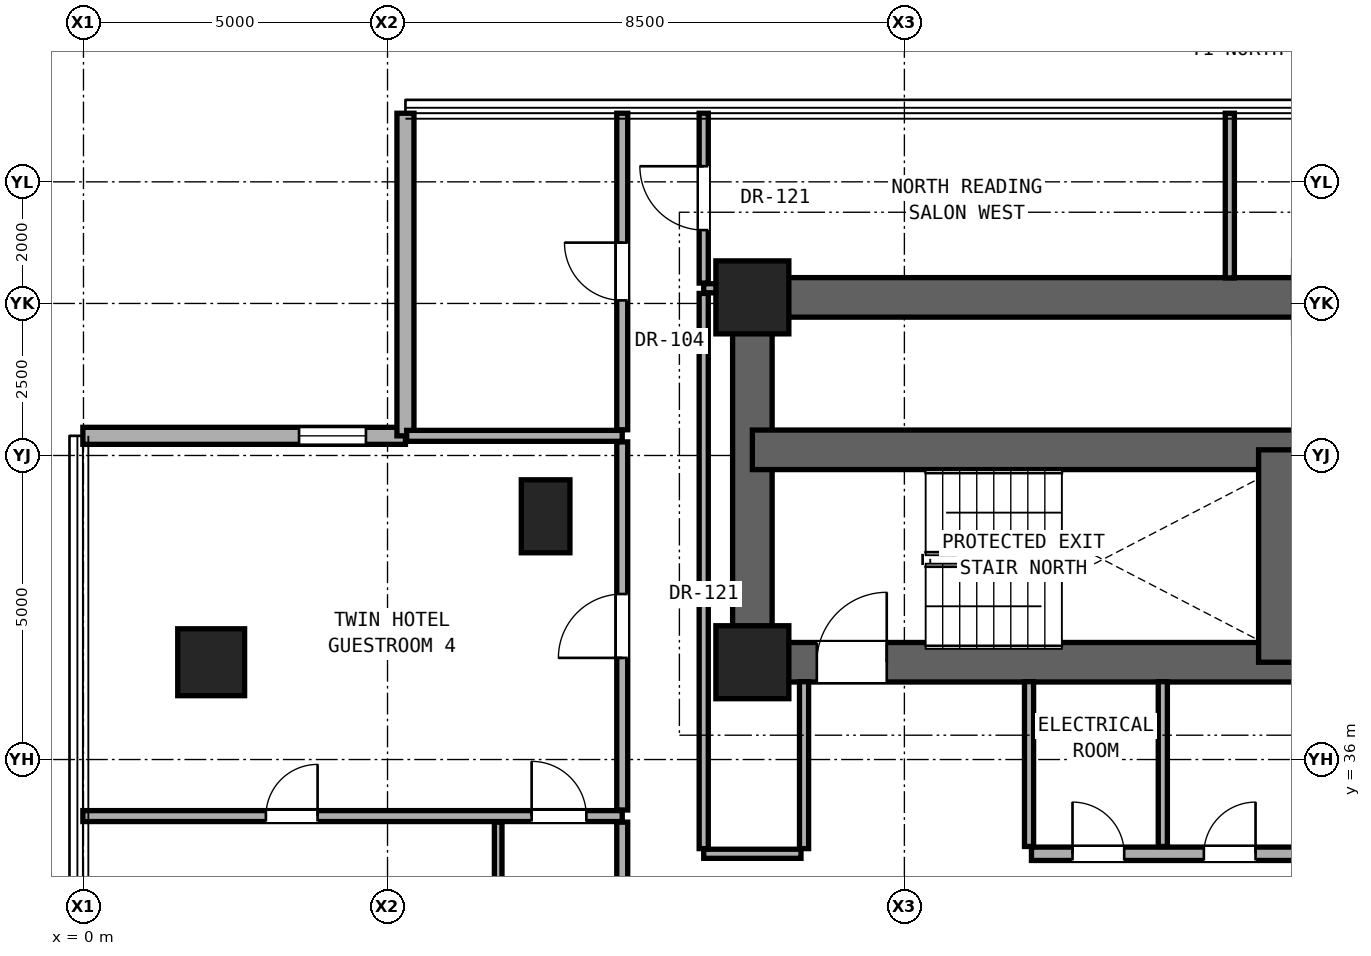
"""IFC4 building model, lengths in metres.
Left out: names, types, materials, properties, quantities, classifications, styles, units other than length and angle.
Written with IfcOpenShell. Run it as: python <this file> out.ifc"""

import sys

from ifc_helpers import new_model, si_unit, direction, frame, frame_2d, origin, origin_2d, place, context, subcontext, project, spatial, rectangle, hollow_rectangle, extrude, element, fill, save


model = new_model("IFC4")
c1 = context("Model", 3, precision=1e-05, world=origin(), true_north=direction((0.0, 1.0)))
c2 = subcontext(c1, "Body", "Model", "MODEL_VIEW")
j1 = project(units=[si_unit("LENGTHUNIT", "METRE"), si_unit("PLANEANGLEUNIT", "RADIAN")], contexts=[c1])
p1 = place(None, origin())
s1 = spatial("IfcSite", under=j1, at=p1, CompositionType="ELEMENT")
p2 = place(p1, origin())
s2 = spatial("IfcBuilding", under=s1, at=p2, CompositionType="ELEMENT")
p3 = place(p2, frame((0.0, 0.0, 91.7)))
s3 = spatial("IfcBuildingStorey", under=s2, at=p3, CompositionType="ELEMENT", Elevation=91.7)
for number, where, z_axis, x_axis in (
    (1, (11.0, 37.6, 0.0), (0.0, 0.0, 1.0), (1.0, 0.0, 0.0)),
    (2, (11.0, 43.6, 0.0), (0.0, 0.0, 1.0), (1.0, 0.0, 0.0)),
):
    element("IfcColumn", number, at=place(p3, frame(where, z_axis=z_axis, x_axis=x_axis)), inside=s3, PredefinedType="COLUMN", context=c2, shape_type="SweptSolid", body=[
        extrude(rectangle(XDim=1.2, YDim=1.2, at=origin_2d()), origin(), (0.0, 0.0, 1.0), 3.3),
    ])
p4 = place(p3, frame((2.1, 37.6, 0.0), z_axis=(0.0, 0.0, 1.0), x_axis=(1.0, 0.0, 0.0)))
e3 = element("IfcColumn", 3, at=p4, inside=s3, PredefinedType="COLUMN", context=c2, shape_type="SweptSolid", body=[
    extrude(hollow_rectangle(XDim=1.1, YDim=1.1, WallThickness=0.06, at=origin_2d()), origin(), (0.0, 0.0, 1.0), 3.3),
])
p5 = place(p3, frame((7.6, 40.0, 0.0), z_axis=(0.0, 0.0, 1.0), x_axis=(1.0, 0.0, 0.0)))
e4 = element("IfcColumn", 4, at=p5, inside=s3, PredefinedType="PILASTER", context=c2, shape_type="SweptSolid", body=[
    extrude(rectangle(XDim=0.8, YDim=1.2, at=origin_2d()), origin(), (0.0, 0.0, 1.0), 3.3),
])
p6 = place(p3, frame((11.0, 43.6, 0.0), z_axis=(0.0, 0.0, 1.0), x_axis=(1.0, 0.0, 0.0)))
e5 = element("IfcWall", 5, at=p6, inside=s3, PredefinedType="SHEAR", context=c2, shape_type="SweptSolid", body=[
    extrude(rectangle(XDim=19.0, YDim=0.65, at=frame_2d((9.5, 0.0))), origin(), (0.0, 0.0, 1.0), 3.08),
])
p7 = place(p3, frame((11.0, 37.6, 0.0), z_axis=(0.0, 0.0, 1.0), x_axis=(0.0, 1.0, 0.0)))
e6 = element("IfcWall", 6, at=p7, inside=s3, PredefinedType="SHEAR", context=c2, shape_type="SweptSolid", body=[
    extrude(rectangle(XDim=6.0, YDim=0.65, at=frame_2d((3.0, 0.0))), origin(), (0.0, 0.0, 1.0), 3.08),
])
p8 = place(p3, frame((11.0, 37.6, 0.0), z_axis=(0.0, 0.0, 1.0), x_axis=(1.0, 0.0, 0.0)))
e7 = element("IfcWall", 7, at=p8, inside=s3, PredefinedType="SHEAR", context=c2, shape_type="SweptSolid", body=[
    extrude(rectangle(XDim=19.0, YDim=0.65, at=frame_2d((9.5, 0.0))), origin(), (0.0, 0.0, 1.0), 3.08),
])
p9 = place(p8, frame((1.06, 0.0, 0.0)))
e8 = element("IfcOpeningElement", 8, at=p9, cuts=e7, PredefinedType="OPENING", context=c2, shape_type="SweptSolid", body=[
    extrude(rectangle(XDim=1.15, YDim=2.2, at=frame_2d((0.575, 1.1))), frame((0.0, 0.335, 0.0), z_axis=(0.0, -1.0, 0.0), x_axis=(1.0, 0.0, 0.0)), (0.0, 0.0, 1.0), 0.67),
])
p10 = place(p8, frame((9.55, 0.0, 0.0)))
e9 = element("IfcOpeningElement", 9, at=p10, cuts=e7, PredefinedType="OPENING", context=c2, shape_type="SweptSolid", body=[
    extrude(rectangle(XDim=1.4, YDim=2.35, at=frame_2d((0.7, 1.175))), frame((0.0, 0.335, 0.0), z_axis=(0.0, -1.0, 0.0), x_axis=(1.0, 0.0, 0.0)), (0.0, 0.0, 1.0), 0.67),
])
p11 = place(p8, frame((11.95, 0.0, 0.0)))
e10 = element("IfcOpeningElement", 10, at=p11, cuts=e7, PredefinedType="OPENING", context=c2, shape_type="SweptSolid", body=[
    extrude(rectangle(XDim=1.4, YDim=2.35, at=frame_2d((0.7, 1.175))), frame((0.0, 0.335, 0.0), z_axis=(0.0, -1.0, 0.0), x_axis=(1.0, 0.0, 0.0)), (0.0, 0.0, 1.0), 0.67),
])
p12 = place(p8, frame((14.4, 0.0, 0.0)))
e11 = element("IfcOpeningElement", 11, at=p12, cuts=e7, PredefinedType="OPENING", context=c2, shape_type="SweptSolid", body=[
    extrude(rectangle(XDim=1.3, YDim=2.3, at=frame_2d((0.65, 1.15))), frame((0.0, 0.335, 0.0), z_axis=(0.0, -1.0, 0.0), x_axis=(1.0, 0.0, 0.0)), (0.0, 0.0, 1.0), 0.67),
])
p13 = place(p8, frame((16.6, 0.0, 0.0)))
e12 = element("IfcOpeningElement", 12, at=p13, cuts=e7, PredefinedType="OPENING", context=c2, shape_type="SweptSolid", body=[
    extrude(rectangle(XDim=1.3, YDim=2.3, at=frame_2d((0.65, 1.15))), frame((0.0, 0.335, 0.0), z_axis=(0.0, -1.0, 0.0), x_axis=(1.0, 0.0, 0.0)), (0.0, 0.0, 1.0), 0.67),
])
p14 = place(p3, frame((11.0, 41.093, 0.0), z_axis=(0.0, 0.0, 1.0), x_axis=(1.0, 0.0, 0.0)))
e13 = element("IfcWall", 13, at=p14, inside=s3, PredefinedType="SHEAR", context=c2, shape_type="SweptSolid", body=[
    extrude(rectangle(XDim=9.0, YDim=0.65, at=frame_2d((4.5, 0.0))), origin(), (0.0, 0.0, 1.0), 3.08),
])
p15 = place(p3, frame((19.65, 37.6, 0.0), z_axis=(0.0, 0.0, 1.0), x_axis=(0.0, 1.0, 0.0)))
e14 = element("IfcWall", 14, at=p15, inside=s3, PredefinedType="SHEAR", context=c2, shape_type="SweptSolid", body=[
    extrude(rectangle(XDim=3.493, YDim=0.65, at=frame_2d((1.747, 0.0))), origin(), (0.0, 0.0, 1.0), 3.08),
])
p16 = place(p3, frame((5.295, 41.323, 0.0), z_axis=(0.0, 0.0, 1.0), x_axis=(-1.0, 0.0, 0.0)))
e15 = element("IfcWall", 15, at=p16, inside=s3, PredefinedType="SOLIDWALL", context=c2, shape_type="SweptSolid", body=[
    extrude(rectangle(XDim=5.305, YDim=0.28, at=frame_2d((2.652, 0.0))), origin(), (0.0, 0.0, 1.0), 3.06),
])
p17 = place(p16, frame((0.65, 0.0, 0.85)))
e16 = element("IfcOpeningElement", 16, at=p17, cuts=e15, PredefinedType="OPENING", context=c2, shape_type="SweptSolid", body=[
    extrude(rectangle(XDim=1.1, YDim=2.0, at=frame_2d((0.55, 1.0))), frame((0.0, 0.15, 0.0), z_axis=(0.0, -1.0, 0.0), x_axis=(1.0, 0.0, 0.0)), (0.0, 0.0, 1.0), 0.3),
])
p18 = place(p3, frame((5.295, 46.628, 0.0), z_axis=(0.0, 0.0, 1.0), x_axis=(0.0, -1.0, 0.0)))
e17 = element("IfcWall", 17, at=p18, inside=s3, PredefinedType="SOLIDWALL", context=c2, shape_type="SweptSolid", body=[
    extrude(rectangle(XDim=5.305, YDim=0.28, at=frame_2d((2.652, 0.0))), origin(), (0.0, 0.0, 1.0), 3.06),
])
p19 = place(p3, frame((10.2, 34.45, 0.0), z_axis=(0.0, 0.0, 1.0), x_axis=(1.0, 0.0, 0.0)))
e18 = element("IfcWall", 18, at=p19, inside=s3, PredefinedType="PARTITIONING", context=c2, shape_type="SweptSolid", body=[
    extrude(rectangle(XDim=1.6, YDim=0.15, at=frame_2d((0.8, 0.0))), origin(), (0.0, 0.0, 1.0), 2.124),
])
p20 = place(p3, frame((15.59, 34.45, 0.0), z_axis=(0.0, 0.0, 1.0), x_axis=(1.0, 0.0, 0.0)))
e19 = element("IfcWall", 19, at=p20, inside=s3, PredefinedType="SOLIDWALL", context=c2, shape_type="SweptSolid", body=[
    extrude(rectangle(XDim=15.21, YDim=0.22, at=frame_2d((7.605, 0.0))), origin(), (0.0, 0.0, 1.0), 2.124),
])
p21 = place(p20, frame((6.435, 0.0, 0.0)))
e20 = element("IfcOpeningElement", 20, at=p21, cuts=e19, PredefinedType="OPENING", context=c2, shape_type="SweptSolid", body=[
    extrude(rectangle(XDim=0.85, YDim=2.01, at=frame_2d((0.425, 1.005))), frame((0.0, 0.12, 0.0), z_axis=(0.0, -1.0, 0.0), x_axis=(1.0, 0.0, 0.0)), (0.0, 0.0, 1.0), 0.24),
])
p22 = place(p20, frame((11.135, 0.0, 0.0)))
e21 = element("IfcOpeningElement", 21, at=p22, cuts=e19, PredefinedType="OPENING", context=c2, shape_type="SweptSolid", body=[
    extrude(rectangle(XDim=0.85, YDim=2.01, at=frame_2d((0.425, 1.005))), frame((0.0, 0.12, 0.0), z_axis=(0.0, -1.0, 0.0), x_axis=(1.0, 0.0, 0.0)), (0.0, 0.0, 1.0), 0.24),
])
p23 = place(p20, frame((0.675, 0.0, 0.0)))
e22 = element("IfcOpeningElement", 22, at=p23, cuts=e19, PredefinedType="OPENING", context=c2, shape_type="SweptSolid", body=[
    extrude(rectangle(XDim=0.85, YDim=2.01, at=frame_2d((0.425, 1.005))), frame((0.0, 0.12, 0.0), z_axis=(0.0, -1.0, 0.0), x_axis=(1.0, 0.0, 0.0)), (0.0, 0.0, 1.0), 0.24),
])
p24 = place(p20, frame((2.835, 0.0, 0.0)))
e23 = element("IfcOpeningElement", 23, at=p24, cuts=e19, PredefinedType="OPENING", context=c2, shape_type="SweptSolid", body=[
    extrude(rectangle(XDim=0.85, YDim=2.01, at=frame_2d((0.425, 1.005))), frame((0.0, 0.12, 0.0), z_axis=(0.0, -1.0, 0.0), x_axis=(1.0, 0.0, 0.0)), (0.0, 0.0, 1.0), 0.24),
])
p25 = place(p3, frame((-0.01, 35.07, 0.0), z_axis=(0.0, 0.0, 1.0), x_axis=(1.0, 0.0, 0.0)))
e24 = element("IfcWall", 24, at=p25, inside=s3, PredefinedType="PARTITIONING", context=c2, shape_type="SweptSolid", body=[
    extrude(rectangle(XDim=8.87, YDim=0.18, at=frame_2d((4.435, 0.0))), origin(), (0.0, 0.0, 1.0), 2.145),
])
p26 = place(p25, frame((3.01, 0.0, 0.0)))
e25 = element("IfcOpeningElement", 25, at=p26, cuts=e24, PredefinedType="OPENING", context=c2, shape_type="SweptSolid", body=[
    extrude(rectangle(XDim=0.85, YDim=2.01, at=frame_2d((0.425, 1.005))), frame((0.0, 0.1, 0.0), z_axis=(0.0, -1.0, 0.0), x_axis=(1.0, 0.0, 0.0)), (0.0, 0.0, 1.0), 0.2),
])
p27 = place(p25, frame((7.38, 0.0, 0.0)))
e26 = element("IfcOpeningElement", 26, at=p27, cuts=e24, PredefinedType="OPENING", context=c2, shape_type="SweptSolid", body=[
    extrude(rectangle(XDim=0.9, YDim=2.1, at=frame_2d((0.45, 1.05))), frame((0.0, 0.1, 0.0), z_axis=(0.0, -1.0, 0.0), x_axis=(1.0, 0.0, 0.0)), (0.0, 0.0, 1.0), 0.2),
])
p28 = place(p3, frame((5.315, 41.323, 0.0), z_axis=(0.0, 0.0, 1.0), x_axis=(1.0, 0.0, 0.0)))
e27 = element("IfcWall", 27, at=p28, inside=s3, PredefinedType="PARTITIONING", context=c2, shape_type="SweptSolid", body=[
    extrude(rectangle(XDim=3.545, YDim=0.18, at=frame_2d((1.772, 0.0))), origin(), (0.0, 0.0, 1.0), 3.08),
])
p29 = place(p3, frame((10.2, 43.75, 0.0), z_axis=(0.0, 0.0, 1.0), x_axis=(1.0, 0.0, 0.0)))
e28 = element("IfcWall", 28, at=p29, inside=s3, PredefinedType="PARTITIONING", context=c2, shape_type="SweptSolid", body=[
    extrude(rectangle(XDim=0.48, YDim=0.15, at=frame_2d((0.24, 0.0))), origin(), (0.0, 0.0, 1.0), 3.08),
])
p30 = place(p3, frame((6.82, 32.87, 0.0), z_axis=(0.0, 0.0, 1.0), x_axis=(0.0, 1.0, 0.0)))
e29 = element("IfcWall", 29, at=p30, inside=s3, PredefinedType="PARTITIONING", context=c2, shape_type="SweptSolid", body=[
    extrude(rectangle(XDim=2.1, YDim=0.125, at=frame_2d((1.05, 0.0))), origin(), (0.0, 0.0, 1.0), 3.08),
])
p31 = place(p3, frame((8.86, 32.87, 0.0), z_axis=(0.0, 0.0, 1.0), x_axis=(0.0, 1.0, 0.0)))
e30 = element("IfcWall", 30, at=p31, inside=s3, PredefinedType="PARTITIONING", context=c2, shape_type="SweptSolid", body=[
    extrude(rectangle(XDim=2.1, YDim=0.18, at=frame_2d((1.05, 0.0))), origin(), (0.0, 0.0, 1.0), 3.08),
])
p32 = place(p3, frame((8.86, 35.17, 0.0), z_axis=(0.0, 0.0, 1.0), x_axis=(0.0, 1.0, 0.0)))
e31 = element("IfcWall", 31, at=p32, inside=s3, PredefinedType="PARTITIONING", context=c2, shape_type="SweptSolid", body=[
    extrude(rectangle(XDim=6.053, YDim=0.18, at=frame_2d((3.026, 0.0))), origin(), (0.0, 0.0, 1.0), 2.456),
])
p33 = place(p32, frame((2.501, 0.0, 0.0)))
e32 = element("IfcOpeningElement", 32, at=p33, cuts=e31, PredefinedType="OPENING", context=c2, shape_type="SweptSolid", body=[
    extrude(rectangle(XDim=1.05, YDim=2.2, at=frame_2d((0.525, 1.1))), frame((0.0, 0.1, 0.0), z_axis=(0.0, -1.0, 0.0), x_axis=(1.0, 0.0, 0.0)), (0.0, 0.0, 1.0), 0.2),
])
p34 = place(p3, frame((8.86, 41.423, 0.0), z_axis=(0.0, 0.0, 1.0), x_axis=(0.0, 1.0, 0.0)))
e33 = element("IfcWall", 33, at=p34, inside=s3, PredefinedType="PARTITIONING", context=c2, shape_type="SweptSolid", body=[
    extrude(rectangle(XDim=5.205, YDim=0.18, at=frame_2d((2.603, 0.0))), origin(), (0.0, 0.0, 1.0), 3.08),
])
p35 = place(p34, frame((2.127, 0.0, 0.0)))
e34 = element("IfcOpeningElement", 34, at=p35, cuts=e33, PredefinedType="OPENING", context=c2, shape_type="SweptSolid", body=[
    extrude(rectangle(XDim=0.95, YDim=2.15, at=frame_2d((0.475, 1.075))), frame((0.0, 0.1, 0.0), z_axis=(0.0, -1.0, 0.0), x_axis=(1.0, 0.0, 0.0)), (0.0, 0.0, 1.0), 0.2),
])
p36 = place(p3, frame((10.2, 34.535, 0.0), z_axis=(0.0, 0.0, 1.0), x_axis=(0.0, 1.0, 0.0)))
e35 = element("IfcWall", 35, at=p36, inside=s3, PredefinedType="PARTITIONING", context=c2, shape_type="SweptSolid", body=[
    extrude(rectangle(XDim=9.13, YDim=0.15, at=frame_2d((4.565, 0.0))), origin(), (0.0, 0.0, 1.0), 2.456),
])
p37 = place(p3, frame((10.2, 43.835, 0.0), z_axis=(0.0, 0.0, 1.0), x_axis=(0.0, 1.0, 0.0)))
e36 = element("IfcWall", 36, at=p37, inside=s3, PredefinedType="PARTITIONING", context=c2, shape_type="SweptSolid", body=[
    extrude(rectangle(XDim=2.793, YDim=0.15, at=frame_2d((1.396, 0.0))), origin(), (0.0, 0.0, 1.0), 3.08),
])
p38 = place(p37, frame((0.872, 0.0, 0.0)))
e37 = element("IfcOpeningElement", 37, at=p38, cuts=e36, PredefinedType="OPENING", context=c2, shape_type="SweptSolid", body=[
    extrude(rectangle(XDim=1.05, YDim=2.2, at=frame_2d((0.525, 1.1))), frame((0.0, 0.085, 0.0), z_axis=(0.0, -1.0, 0.0), x_axis=(1.0, 0.0, 0.0)), (0.0, 0.0, 1.0), 0.17),
])
p39 = place(p3, frame((11.85, 34.535, 0.0), z_axis=(0.0, 0.0, 1.0), x_axis=(0.0, 1.0, 0.0)))
e38 = element("IfcWall", 38, at=p39, inside=s3, PredefinedType="PARTITIONING", context=c2, shape_type="SweptSolid", body=[
    extrude(rectangle(XDim=2.745, YDim=0.15, at=frame_2d((1.373, 0.0))), origin(), (0.0, 0.0, 1.0), 3.08),
])
p40 = place(p3, frame((15.55, 34.57, 0.0), z_axis=(0.0, 0.0, 1.0), x_axis=(0.0, 1.0, 0.0)))
e39 = element("IfcWall", 39, at=p40, inside=s3, PredefinedType="PARTITIONING", context=c2, shape_type="SweptSolid", body=[
    extrude(rectangle(XDim=2.71, YDim=0.15, at=frame_2d((1.355, 0.0))), origin(), (0.0, 0.0, 1.0), 2.609),
])
p41 = place(p3, frame((17.75, 34.57, 0.0), z_axis=(0.0, 0.0, 1.0), x_axis=(0.0, 1.0, 0.0)))
e40 = element("IfcWall", 40, at=p41, inside=s3, PredefinedType="PARTITIONING", context=c2, shape_type="SweptSolid", body=[
    extrude(rectangle(XDim=2.71, YDim=0.15, at=frame_2d((1.355, 0.0))), origin(), (0.0, 0.0, 1.0), 3.08),
])
p42 = place(p3, frame((18.852, 43.92, 0.0), z_axis=(0.0, 0.0, 1.0), x_axis=(0.0, 1.0, 0.0)))
e41 = element("IfcWall", 41, at=p42, inside=s3, PredefinedType="PARTITIONING", context=c2, shape_type="SweptSolid", body=[
    extrude(rectangle(XDim=2.708, YDim=0.15, at=frame_2d((1.354, 0.0))), origin(), (0.0, 0.0, 1.0), 3.08),
])
p43 = place(p17, origin())
e42 = element("IfcWindow", 42, at=p43, inside=s3, PartitioningType="SINGLE_PANEL", PredefinedType="WINDOW", context=c2, shape_type="SweptSolid", body=[
    extrude(rectangle(XDim=1.1, YDim=2.0, at=frame_2d((0.55, 1.0))), frame((0.0, 0.03, 0.0), z_axis=(0.0, -1.0, 0.0), x_axis=(1.0, 0.0, 0.0)), (0.0, 0.0, 1.0), 0.06),
])
fill(e16, e42)
p44 = place(p9, origin())
e43 = element("IfcDoor", 43, at=p44, inside=s3, OperationType="SINGLE_SWING_RIGHT", PredefinedType="DOOR", context=c2, shape_type="SweptSolid", body=[
    extrude(rectangle(XDim=1.15, YDim=2.2, at=frame_2d((0.575, 1.1))), frame((0.0, 0.025, 0.0), z_axis=(0.0, -1.0, 0.0), x_axis=(1.0, 0.0, 0.0)), (0.0, 0.0, 1.0), 0.05),
])
fill(e8, e43)
p45 = place(p23, origin())
e44 = element("IfcDoor", 44, at=p45, inside=s3, OperationType="SINGLE_SWING_LEFT", PredefinedType="DOOR", context=c2, shape_type="SweptSolid", body=[
    extrude(rectangle(XDim=0.85, YDim=2.01, at=frame_2d((0.425, 1.005))), frame((0.0, 0.025, 0.0), z_axis=(0.0, -1.0, 0.0), x_axis=(1.0, 0.0, 0.0)), (0.0, 0.0, 1.0), 0.05),
])
fill(e22, e44)
p46 = place(p24, origin())
e45 = element("IfcDoor", 45, at=p46, inside=s3, OperationType="SINGLE_SWING_RIGHT", PredefinedType="DOOR", context=c2, shape_type="SweptSolid", body=[
    extrude(rectangle(XDim=0.85, YDim=2.01, at=frame_2d((0.425, 1.005))), frame((0.0, 0.025, 0.0), z_axis=(0.0, -1.0, 0.0), x_axis=(1.0, 0.0, 0.0)), (0.0, 0.0, 1.0), 0.05),
])
fill(e23, e45)
p47 = place(p33, origin())
e46 = element("IfcDoor", 46, at=p47, inside=s3, OperationType="SINGLE_SWING_LEFT", PredefinedType="DOOR", context=c2, shape_type="SweptSolid", body=[
    extrude(rectangle(XDim=1.05, YDim=2.2, at=frame_2d((0.525, 1.1))), frame((0.0, 0.025, 0.0), z_axis=(0.0, -1.0, 0.0), x_axis=(1.0, 0.0, 0.0)), (0.0, 0.0, 1.0), 0.05),
])
fill(e32, e46)
p48 = place(p26, origin())
e47 = element("IfcDoor", 47, at=p48, inside=s3, OperationType="SINGLE_SWING_RIGHT", PredefinedType="DOOR", context=c2, shape_type="SweptSolid", body=[
    extrude(rectangle(XDim=0.85, YDim=2.01, at=frame_2d((0.425, 1.005))), frame((0.0, 0.025, 0.0), z_axis=(0.0, -1.0, 0.0), x_axis=(1.0, 0.0, 0.0)), (0.0, 0.0, 1.0), 0.05),
])
fill(e25, e47)
p49 = place(p27, origin())
e48 = element("IfcDoor", 48, at=p49, inside=s3, OperationType="SINGLE_SWING_LEFT", PredefinedType="DOOR", context=c2, shape_type="SweptSolid", body=[
    extrude(rectangle(XDim=0.9, YDim=2.1, at=frame_2d((0.45, 1.05))), frame((0.0, 0.025, 0.0), z_axis=(0.0, -1.0, 0.0), x_axis=(1.0, 0.0, 0.0)), (0.0, 0.0, 1.0), 0.05),
])
fill(e26, e48)
p50 = place(p38, origin())
e49 = element("IfcDoor", 49, at=p50, inside=s3, OperationType="SINGLE_SWING_RIGHT", PredefinedType="DOOR", context=c2, shape_type="SweptSolid", body=[
    extrude(rectangle(XDim=1.05, YDim=2.2, at=frame_2d((0.525, 1.1))), frame((0.0, 0.025, 0.0), z_axis=(0.0, -1.0, 0.0), x_axis=(1.0, 0.0, 0.0)), (0.0, 0.0, 1.0), 0.05),
])
fill(e37, e49)
p51 = place(p35, origin())
e50 = element("IfcDoor", 50, at=p51, inside=s3, OperationType="SINGLE_SWING_RIGHT", PredefinedType="DOOR", context=c2, shape_type="SweptSolid", body=[
    extrude(rectangle(XDim=0.95, YDim=2.15, at=frame_2d((0.475, 1.075))), frame((0.0, 0.025, 0.0), z_axis=(0.0, -1.0, 0.0), x_axis=(1.0, 0.0, 0.0)), (0.0, 0.0, 1.0), 0.05),
])
fill(e34, e50)
save(model, sys.argv[1])
